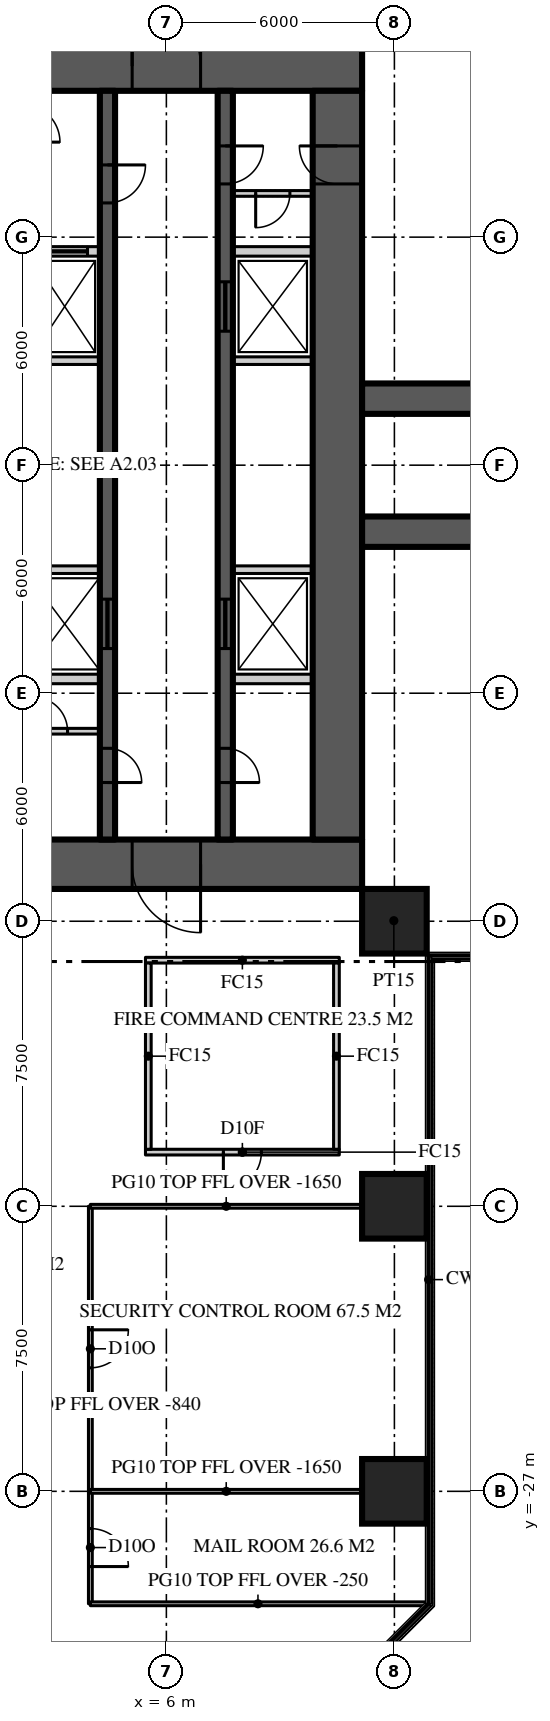
"""IFC4 building model, lengths in metres.
Left out: names, types, materials, properties, quantities, classifications, styles, units other than length and angle.
Written with IfcOpenShell. Run it as: python <this file> out.ifc"""

import sys

from ifc_helpers import new_model, si_unit, direction, frame, frame_2d, origin, origin_2d, place, context, subcontext, project, spatial, rectangle, extrude, element, fill, save


model = new_model("IFC4")
c1 = context("Model", 3, precision=1e-05, world=origin(), true_north=direction((0.0, 1.0)))
c2 = subcontext(c1, "Body", "Model", "MODEL_VIEW")
j1 = project(units=[si_unit("LENGTHUNIT", "METRE"), si_unit("PLANEANGLEUNIT", "RADIAN")], contexts=[c1])
p1 = place(None, origin())
s1 = spatial("IfcSite", under=j1, at=p1, CompositionType="ELEMENT")
p2 = place(p1, origin())
s2 = spatial("IfcBuilding", under=s1, at=p2, CompositionType="ELEMENT")
p3 = place(p2, origin())
s3 = spatial("IfcBuildingStorey", under=s2, at=p3, CompositionType="ELEMENT", Elevation=0.0)
p4 = place(p3, frame((-11.15, 10.5, 0.0), z_axis=(0.0, 0.0, 1.0), x_axis=(1.0, 0.0, 0.0)))
e1 = element("IfcWall", 1, at=p4, inside=s3, PredefinedType="SHEAR", context=c2, shape_type="SweptSolid", body=[
    extrude(rectangle(XDim=22.3, YDim=1.3, at=frame_2d((11.15, 0.0))), origin(), (0.0, 0.0, 1.0), 7.0),
])
p5 = place(p4, frame((4.25, 0.0, 0.0)))
e2 = element("IfcOpeningElement", 2, at=p5, cuts=e1, PredefinedType="OPENING", context=c2, shape_type="SweptSolid", body=[
    extrude(rectangle(XDim=1.8, YDim=2.2, at=frame_2d((0.9, 1.1))), frame((0.0, 0.66, 0.0), z_axis=(0.0, -1.0, 0.0), x_axis=(1.0, 0.0, 0.0)), (0.0, 0.0, 1.0), 1.32),
])
p6 = place(p4, frame((16.25, 0.0, 0.0)))
e3 = element("IfcOpeningElement", 3, at=p6, cuts=e1, PredefinedType="OPENING", context=c2, shape_type="SweptSolid", body=[
    extrude(rectangle(XDim=1.8, YDim=2.2, at=frame_2d((0.9, 1.1))), frame((0.0, 0.66, 0.0), z_axis=(0.0, -1.0, 0.0), x_axis=(1.0, 0.0, 0.0)), (0.0, 0.0, 1.0), 1.32),
])
p7 = place(p3, frame((11.15, -10.5, 0.0), z_axis=(0.0, 0.0, 1.0), x_axis=(-1.0, 0.0, 0.0)))
e4 = element("IfcWall", 4, at=p7, inside=s3, PredefinedType="SHEAR", context=c2, shape_type="SweptSolid", body=[
    extrude(rectangle(XDim=22.3, YDim=1.3, at=frame_2d((11.15, 0.0))), origin(), (0.0, 0.0, 1.0), 7.0),
])
p8 = place(p7, frame((16.25, 0.0, 0.0)))
e5 = element("IfcOpeningElement", 5, at=p8, cuts=e4, PredefinedType="OPENING", context=c2, shape_type="SweptSolid", body=[
    extrude(rectangle(XDim=1.8, YDim=2.2, at=frame_2d((0.9, 1.1))), frame((0.0, 0.66, 0.0), z_axis=(0.0, -1.0, 0.0), x_axis=(1.0, 0.0, 0.0)), (0.0, 0.0, 1.0), 1.32),
])
p9 = place(p7, frame((4.25, 0.0, 0.0)))
e6 = element("IfcOpeningElement", 6, at=p9, cuts=e4, PredefinedType="OPENING", context=c2, shape_type="SweptSolid", body=[
    extrude(rectangle(XDim=1.8, YDim=2.2, at=frame_2d((0.9, 1.1))), frame((0.0, 0.66, 0.0), z_axis=(0.0, -1.0, 0.0), x_axis=(1.0, 0.0, 0.0)), (0.0, 0.0, 1.0), 1.32),
])
p10 = place(p3, frame((10.5, -9.85, 0.0), z_axis=(0.0, 0.0, 1.0), x_axis=(0.0, 1.0, 0.0)))
e7 = element("IfcWall", 7, at=p10, inside=s3, PredefinedType="SHEAR", context=c2, shape_type="SweptSolid", body=[
    extrude(rectangle(XDim=19.7, YDim=1.3, at=frame_2d((9.85, 0.0))), origin(), (0.0, 0.0, 1.0), 7.0),
])
p11 = place(p10, frame((17.25, 0.0, 0.0)))
e8 = element("IfcOpeningElement", 8, at=p11, cuts=e7, PredefinedType="OPENING", context=c2, shape_type="SweptSolid", body=[
    extrude(rectangle(XDim=1.0, YDim=2.2, at=frame_2d((0.5, 1.1))), frame((0.0, 0.66, 0.0), z_axis=(0.0, -1.0, 0.0), x_axis=(1.0, 0.0, 0.0)), (0.0, 0.0, 1.0), 1.32),
])
for number, where, z_axis, x_axis in (
    (9, (11.15, -1.75, 0.0), (0.0, 0.0, 1.0), (1.0, 0.0, 0.0)),
    (10, (11.15, 1.75, 0.0), (0.0, 0.0, 1.0), (1.0, 0.0, 0.0)),
):
    element("IfcWall", number, at=place(p3, frame(where, z_axis=z_axis, x_axis=x_axis)), inside=s3, PredefinedType="SHEAR", context=c2, shape_type="SweptSolid", body=[
        extrude(rectangle(XDim=7.625, YDim=0.8, at=frame_2d((3.812, 0.0))), origin(), (0.0, 0.0, 1.0), 7.0),
    ])
for number, where, z_axis, x_axis in (
    (11, (12.0, -27.0, 0.0), (0.0, 0.0, 1.0), (1.0, 0.0, 0.0)),
    (12, (12.0, -19.5, 0.0), (0.0, 0.0, 1.0), (1.0, 0.0, 0.0)),
    (13, (12.0, -12.0, 0.0), (0.0, 0.0, 1.0), (1.0, 0.0, 0.0)),
):
    element("IfcColumn", number, at=place(p3, frame(where, z_axis=z_axis, x_axis=x_axis)), inside=s3, PredefinedType="COLUMN", context=c2, shape_type="SweptSolid", body=[
        extrude(rectangle(XDim=1.7, YDim=1.7, at=origin_2d()), origin(), (0.0, 0.0, 1.0), 7.0),
    ])
p12 = place(p3, frame((7.55, 9.85, 0.0), z_axis=(0.0, 0.0, 1.0), x_axis=(0.0, -1.0, 0.0)))
e14 = element("IfcWall", 14, at=p12, inside=s3, PredefinedType="SHEAR", context=c2, shape_type="SweptSolid", body=[
    extrude(rectangle(XDim=19.7, YDim=0.4, at=frame_2d((9.85, 0.0))), origin(), (0.0, 0.0, 1.0), 7.0),
])
p13 = place(p12, frame((1.45, 0.0, 0.0)))
e15 = element("IfcOpeningElement", 15, at=p13, cuts=e14, PredefinedType="OPENING", context=c2, shape_type="SweptSolid", body=[
    extrude(rectangle(XDim=1.0, YDim=2.2, at=frame_2d((0.5, 1.1))), frame((0.0, 0.21, 0.0), z_axis=(0.0, -1.0, 0.0), x_axis=(1.0, 0.0, 0.0)), (0.0, 0.0, 1.0), 0.42),
])
p14 = place(p12, frame((17.3, 0.0, 0.0)))
e16 = element("IfcOpeningElement", 16, at=p14, cuts=e14, PredefinedType="OPENING", context=c2, shape_type="SweptSolid", body=[
    extrude(rectangle(XDim=0.9, YDim=2.1, at=frame_2d((0.45, 1.05))), frame((0.0, 0.21, 0.0), z_axis=(0.0, -1.0, 0.0), x_axis=(1.0, 0.0, 0.0)), (0.0, 0.0, 1.0), 0.42),
])
p15 = place(p12, frame((5.025, 0.0, 0.0)))
e17 = element("IfcOpeningElement", 17, at=p15, cuts=e14, PredefinedType="OPENING", context=c2, shape_type="SweptSolid", body=[
    extrude(rectangle(XDim=1.3, YDim=2.2, at=frame_2d((0.65, 1.1))), frame((0.0, 0.21, 0.0), z_axis=(0.0, -1.0, 0.0), x_axis=(1.0, 0.0, 0.0)), (0.0, 0.0, 1.0), 0.42),
])
p16 = place(p12, frame((13.375, 0.0, 0.0)))
e18 = element("IfcOpeningElement", 18, at=p16, cuts=e14, PredefinedType="OPENING", context=c2, shape_type="SweptSolid", body=[
    extrude(rectangle(XDim=1.3, YDim=2.2, at=frame_2d((0.65, 1.1))), frame((0.0, 0.21, 0.0), z_axis=(0.0, -1.0, 0.0), x_axis=(1.0, 0.0, 0.0)), (0.0, 0.0, 1.0), 0.42),
])
p17 = place(p3, frame((4.45, 9.85, 0.0), z_axis=(0.0, 0.0, 1.0), x_axis=(0.0, -1.0, 0.0)))
e19 = element("IfcWall", 19, at=p17, inside=s3, PredefinedType="SHEAR", context=c2, shape_type="SweptSolid", body=[
    extrude(rectangle(XDim=19.7, YDim=0.4, at=frame_2d((9.85, 0.0))), origin(), (0.0, 0.0, 1.0), 7.0),
])
p18 = place(p17, frame((1.95, 0.0, 0.0)))
e20 = element("IfcOpeningElement", 20, at=p18, cuts=e19, PredefinedType="OPENING", context=c2, shape_type="SweptSolid", body=[
    extrude(rectangle(XDim=1.0, YDim=2.2, at=frame_2d((0.5, 1.1))), frame((0.0, 0.21, 0.0), z_axis=(0.0, -1.0, 0.0), x_axis=(1.0, 0.0, 0.0)), (0.0, 0.0, 1.0), 0.42),
])
p19 = place(p17, frame((17.3, 0.0, 0.0)))
e21 = element("IfcOpeningElement", 21, at=p19, cuts=e19, PredefinedType="OPENING", context=c2, shape_type="SweptSolid", body=[
    extrude(rectangle(XDim=0.9, YDim=2.1, at=frame_2d((0.45, 1.05))), frame((0.0, 0.21, 0.0), z_axis=(0.0, -1.0, 0.0), x_axis=(1.0, 0.0, 0.0)), (0.0, 0.0, 1.0), 0.42),
])
p20 = place(p17, frame((13.375, 0.0, 0.0)))
e22 = element("IfcOpeningElement", 22, at=p20, cuts=e19, PredefinedType="OPENING", context=c2, shape_type="SweptSolid", body=[
    extrude(rectangle(XDim=1.3, YDim=2.2, at=frame_2d((0.65, 1.1))), frame((0.0, 0.21, 0.0), z_axis=(0.0, -1.0, 0.0), x_axis=(1.0, 0.0, 0.0)), (0.0, 0.0, 1.0), 0.42),
])
p21 = place(p3, frame((2.4, 5.625, 0.0), z_axis=(0.0, 0.0, 1.0), x_axis=(1.0, 0.0, 0.0)))
e23 = element("IfcWall", 23, at=p21, inside=s3, PredefinedType="SOLIDWALL", context=c2, shape_type="SweptSolid", body=[
    extrude(rectangle(XDim=1.85, YDim=0.25, at=frame_2d((0.925, 0.0))), origin(), (0.0, 0.0, 1.0), 6.8),
])
p22 = place(p21, frame((0.325, 0.0, 0.0)))
e24 = element("IfcOpeningElement", 24, at=p22, cuts=e23, PredefinedType="OPENING", context=c2, shape_type="SweptSolid", body=[
    extrude(rectangle(XDim=1.2, YDim=2.2, at=frame_2d((0.6, 1.1))), frame((0.0, 0.135, 0.0), z_axis=(0.0, -1.0, 0.0), x_axis=(1.0, 0.0, 0.0)), (0.0, 0.0, 1.0), 0.27),
])
p23 = place(p3, frame((7.75, 5.625, 0.0), z_axis=(0.0, 0.0, 1.0), x_axis=(1.0, 0.0, 0.0)))
e25 = element("IfcWall", 25, at=p23, inside=s3, PredefinedType="SOLIDWALL", context=c2, shape_type="SweptSolid", body=[
    extrude(rectangle(XDim=2.1, YDim=0.25, at=frame_2d((1.05, 0.0))), origin(), (0.0, 0.0, 1.0), 6.8),
])
p24 = place(p3, frame((2.4, -5.625, 0.0), z_axis=(0.0, 0.0, 1.0), x_axis=(1.0, 0.0, 0.0)))
e26 = element("IfcWall", 26, at=p24, inside=s3, PredefinedType="SOLIDWALL", context=c2, shape_type="SweptSolid", body=[
    extrude(rectangle(XDim=1.85, YDim=0.25, at=frame_2d((0.925, 0.0))), origin(), (0.0, 0.0, 1.0), 6.8),
])
p25 = place(p3, frame((7.75, -5.625, 0.0), z_axis=(0.0, 0.0, 1.0), x_axis=(1.0, 0.0, 0.0)))
e27 = element("IfcWall", 27, at=p25, inside=s3, PredefinedType="SOLIDWALL", context=c2, shape_type="SweptSolid", body=[
    extrude(rectangle(XDim=2.1, YDim=0.25, at=frame_2d((1.05, 0.0))), origin(), (0.0, 0.0, 1.0), 6.8),
])
p26 = place(p3, frame((2.4, -2.75, 0.0), z_axis=(0.0, 0.0, 1.0), x_axis=(1.0, 0.0, 0.0)))
e28 = element("IfcWall", 28, at=p26, inside=s3, PredefinedType="SOLIDWALL", context=c2, shape_type="SweptSolid", body=[
    extrude(rectangle(XDim=1.85, YDim=0.2, at=frame_2d((0.925, 0.0))), origin(), (0.0, 0.0, 1.0), 6.8),
])
p27 = place(p3, frame((7.75, -2.75, 0.0), z_axis=(0.0, 0.0, 1.0), x_axis=(1.0, 0.0, 0.0)))
e29 = element("IfcWall", 29, at=p27, inside=s3, PredefinedType="SOLIDWALL", context=c2, shape_type="SweptSolid", body=[
    extrude(rectangle(XDim=2.1, YDim=0.2, at=frame_2d((1.05, 0.0))), origin(), (0.0, 0.0, 1.0), 6.8),
])
p28 = place(p3, frame((2.4, 2.75, 0.0), z_axis=(0.0, 0.0, 1.0), x_axis=(1.0, 0.0, 0.0)))
e30 = element("IfcWall", 30, at=p28, inside=s3, PredefinedType="SOLIDWALL", context=c2, shape_type="SweptSolid", body=[
    extrude(rectangle(XDim=1.85, YDim=0.2, at=frame_2d((0.925, 0.0))), origin(), (0.0, 0.0, 1.0), 6.8),
])
p29 = place(p3, frame((7.75, 2.75, 0.0), z_axis=(0.0, 0.0, 1.0), x_axis=(1.0, 0.0, 0.0)))
e31 = element("IfcWall", 31, at=p29, inside=s3, PredefinedType="SOLIDWALL", context=c2, shape_type="SweptSolid", body=[
    extrude(rectangle(XDim=2.1, YDim=0.2, at=frame_2d((1.05, 0.0))), origin(), (0.0, 0.0, 1.0), 6.8),
])
p30 = place(p3, frame((4.0, -19.5, 0.0), z_axis=(0.0, 0.0, 1.0), x_axis=(0.0, -1.0, 0.0)))
e32 = element("IfcWall", 32, at=p30, inside=s3, PredefinedType="PARTITIONING", context=c2, shape_type="SweptSolid", body=[
    extrude(rectangle(XDim=10.459, YDim=0.1, at=frame_2d((5.229, 0.0))), origin(), (0.0, 0.0, 1.0), 6.16),
])
p31 = place(p30, frame((3.25, 0.0, 0.0)))
e33 = element("IfcOpeningElement", 33, at=p31, cuts=e32, PredefinedType="OPENING", context=c2, shape_type="SweptSolid", body=[
    extrude(rectangle(XDim=1.0, YDim=2.2, at=frame_2d((0.5, 1.1))), frame((0.0, 0.06, 0.0), z_axis=(0.0, -1.0, 0.0), x_axis=(1.0, 0.0, 0.0)), (0.0, 0.0, 1.0), 0.12),
])
p32 = place(p30, frame((8.479, 0.0, 0.0)))
e34 = element("IfcOpeningElement", 34, at=p32, cuts=e32, PredefinedType="OPENING", context=c2, shape_type="SweptSolid", body=[
    extrude(rectangle(XDim=1.0, YDim=2.2, at=frame_2d((0.5, 1.1))), frame((0.0, 0.06, 0.0), z_axis=(0.0, -1.0, 0.0), x_axis=(1.0, 0.0, 0.0)), (0.0, 0.0, 1.0), 0.12),
])
for number, where, z_axis, x_axis in (
    (35, (4.0, -19.5, 0.0), (0.0, 0.0, 1.0), (1.0, 0.0, 0.0)),
    (36, (4.0, -27.0, 0.0), (0.0, 0.0, 1.0), (1.0, 0.0, 0.0)),
):
    element("IfcWall", number, at=place(p3, frame(where, z_axis=z_axis, x_axis=x_axis)), inside=s3, PredefinedType="PARTITIONING", context=c2, shape_type="SweptSolid", body=[
        extrude(rectangle(XDim=7.15, YDim=0.1, at=frame_2d((3.575, 0.0))), origin(), (0.0, 0.0, 1.0), 5.35),
    ])
p33 = place(p3, frame((4.0, -29.959, 0.0), z_axis=(0.0, 0.0, 1.0), x_axis=(1.0, 0.0, 0.0)))
e37 = element("IfcWall", 37, at=p33, inside=s3, PredefinedType="PARTITIONING", context=c2, shape_type="SweptSolid", body=[
    extrude(rectangle(XDim=8.82, YDim=0.1, at=frame_2d((4.41, 0.0))), origin(), (0.0, 0.0, 1.0), 6.75),
])
p34 = place(p3, frame((11.15, -11.15, 0.0), z_axis=(0.0, 0.0, 1.0), x_axis=(0.707106781187, -0.707106781187, 0.0)))
e38 = element("IfcWall", 38, at=p34, inside=s3, PredefinedType="PARTITIONING", context=c2, shape_type="SweptSolid", body=[
    extrude(rectangle(XDim=2.362, YDim=0.15, at=frame_2d((1.181, 0.0))), origin(), (0.0, 0.0, 1.0), 6.75),
])
p35 = place(p3, frame((2.4, -7.0, 0.0), z_axis=(0.0, 0.0, 1.0), x_axis=(1.0, 0.0, 0.0)))
e39 = element("IfcWall", 39, at=p35, inside=s3, PredefinedType="SOLIDWALL", context=c2, shape_type="SweptSolid", body=[
    extrude(rectangle(XDim=1.85, YDim=0.15, at=frame_2d((0.925, 0.0))), origin(), (0.0, 0.0, 1.0), 6.75),
])
p36 = place(p35, frame((0.1, 0.0, 0.0)))
e40 = element("IfcOpeningElement", 40, at=p36, cuts=e39, PredefinedType="OPENING", context=c2, shape_type="SweptSolid", body=[
    extrude(rectangle(XDim=0.9, YDim=2.1, at=frame_2d((0.45, 1.05))), frame((0.0, 0.085, 0.0), z_axis=(0.0, -1.0, 0.0), x_axis=(1.0, 0.0, 0.0)), (0.0, 0.0, 1.0), 0.17),
])
p37 = place(p3, frame((9.85, 7.15, 0.0), z_axis=(0.0, 0.0, 1.0), x_axis=(-1.0, 0.0, 0.0)))
e41 = element("IfcWall", 41, at=p37, inside=s3, PredefinedType="SOLIDWALL", context=c2, shape_type="SweptSolid", body=[
    extrude(rectangle(XDim=2.1, YDim=0.15, at=frame_2d((1.05, 0.0))), origin(), (0.0, 0.0, 1.0), 6.75),
])
p38 = place(p37, frame((0.6, 0.0, 0.0)))
e42 = element("IfcOpeningElement", 42, at=p38, cuts=e41, PredefinedType="OPENING", context=c2, shape_type="SweptSolid", body=[
    extrude(rectangle(XDim=0.9, YDim=2.1, at=frame_2d((0.45, 1.05))), frame((0.0, 0.085, 0.0), z_axis=(0.0, -1.0, 0.0), x_axis=(1.0, 0.0, 0.0)), (0.0, 0.0, 1.0), 0.17),
])
p39 = place(p3, frame((5.45, -13.025, 0.0), z_axis=(0.0, 0.0, 1.0), x_axis=(1.0, 0.0, 0.0)))
e43 = element("IfcWall", 43, at=p39, inside=s3, PredefinedType="SOLIDWALL", context=c2, shape_type="SweptSolid", body=[
    extrude(rectangle(XDim=5.1, YDim=0.15, at=frame_2d((2.55, 0.0))), origin(), (0.0, 0.0, 1.0), 6.75),
])
p40 = place(p3, frame((10.55, -18.075, 0.0), z_axis=(0.0, 0.0, 1.0), x_axis=(-1.0, 0.0, 0.0)))
e44 = element("IfcWall", 44, at=p40, inside=s3, PredefinedType="SOLIDWALL", context=c2, shape_type="SweptSolid", body=[
    extrude(rectangle(XDim=5.1, YDim=0.15, at=frame_2d((2.55, 0.0))), origin(), (0.0, 0.0, 1.0), 6.75),
])
p41 = place(p40, frame((2.05, 0.0, 0.0)))
e45 = element("IfcOpeningElement", 45, at=p41, cuts=e44, PredefinedType="OPENING", context=c2, shape_type="SweptSolid", body=[
    extrude(rectangle(XDim=1.0, YDim=2.2, at=frame_2d((0.5, 1.1))), frame((0.0, 0.085, 0.0), z_axis=(0.0, -1.0, 0.0), x_axis=(1.0, 0.0, 0.0)), (0.0, 0.0, 1.0), 0.17),
])
for number, where, z_axis, x_axis in (
    (46, (5.525, -13.1, 0.0), (0.0, 0.0, 1.0), (0.0, -1.0, 0.0)),
    (47, (10.475, -18.0, 0.0), (0.0, 0.0, 1.0), (0.0, 1.0, 0.0)),
):
    element("IfcWall", number, at=place(p3, frame(where, z_axis=z_axis, x_axis=x_axis)), inside=s3, PredefinedType="SOLIDWALL", context=c2, shape_type="SweptSolid", body=[
        extrude(rectangle(XDim=4.9, YDim=0.15, at=frame_2d((2.45, 0.0))), origin(), (0.0, 0.0, 1.0), 6.75),
    ])
p42 = place(p6, origin())
e48 = element("IfcDoor", 48, at=p42, inside=s3, OperationType="DOUBLE_DOOR_DOUBLE_SWING", PredefinedType="DOOR", context=c2, shape_type="SweptSolid", body=[
    extrude(rectangle(XDim=1.8, YDim=2.2, at=frame_2d((0.9, 1.1))), frame((0.0, 0.025, 0.0), z_axis=(0.0, -1.0, 0.0), x_axis=(1.0, 0.0, 0.0)), (0.0, 0.0, 1.0), 0.05),
])
fill(e3, e48)
p43 = place(p9, origin())
e49 = element("IfcDoor", 49, at=p43, inside=s3, OperationType="DOUBLE_DOOR_DOUBLE_SWING", PredefinedType="DOOR", context=c2, shape_type="SweptSolid", body=[
    extrude(rectangle(XDim=1.8, YDim=2.2, at=frame_2d((0.9, 1.1))), frame((0.0, 0.025, 0.0), z_axis=(0.0, -1.0, 0.0), x_axis=(1.0, 0.0, 0.0)), (0.0, 0.0, 1.0), 0.05),
])
fill(e6, e49)
p44 = place(p13, origin())
e50 = element("IfcDoor", 50, at=p44, inside=s3, OperationType="SINGLE_SWING_LEFT", PredefinedType="DOOR", context=c2, shape_type="SweptSolid", body=[
    extrude(rectangle(XDim=1.0, YDim=2.2, at=frame_2d((0.5, 1.1))), frame((0.0, 0.025, 0.0), z_axis=(0.0, -1.0, 0.0), x_axis=(1.0, 0.0, 0.0)), (0.0, 0.0, 1.0), 0.05),
])
fill(e15, e50)
p45 = place(p11, origin())
e51 = element("IfcDoor", 51, at=p45, inside=s3, OperationType="SINGLE_SWING_RIGHT", PredefinedType="DOOR", context=c2, shape_type="SweptSolid", body=[
    extrude(rectangle(XDim=1.0, YDim=2.2, at=frame_2d((0.5, 1.1))), frame((0.0, 0.025, 0.0), z_axis=(0.0, -1.0, 0.0), x_axis=(1.0, 0.0, 0.0)), (0.0, 0.0, 1.0), 0.05),
])
fill(e8, e51)
p46 = place(p18, origin())
e52 = element("IfcDoor", 52, at=p46, inside=s3, OperationType="SINGLE_SWING_LEFT", PredefinedType="DOOR", context=c2, shape_type="SweptSolid", body=[
    extrude(rectangle(XDim=1.0, YDim=2.2, at=frame_2d((0.5, 1.1))), frame((0.0, 0.025, 0.0), z_axis=(0.0, -1.0, 0.0), x_axis=(1.0, 0.0, 0.0)), (0.0, 0.0, 1.0), 0.05),
])
fill(e20, e52)
p47 = place(p14, origin())
e53 = element("IfcDoor", 53, at=p47, inside=s3, OperationType="SINGLE_SWING_RIGHT", PredefinedType="DOOR", context=c2, shape_type="SweptSolid", body=[
    extrude(rectangle(XDim=0.9, YDim=2.1, at=frame_2d((0.45, 1.05))), frame((0.0, 0.025, 0.0), z_axis=(0.0, -1.0, 0.0), x_axis=(1.0, 0.0, 0.0)), (0.0, 0.0, 1.0), 0.05),
])
fill(e16, e53)
p48 = place(p19, origin())
e54 = element("IfcDoor", 54, at=p48, inside=s3, OperationType="SINGLE_SWING_RIGHT", PredefinedType="DOOR", context=c2, shape_type="SweptSolid", body=[
    extrude(rectangle(XDim=0.9, YDim=2.1, at=frame_2d((0.45, 1.05))), frame((0.0, 0.025, 0.0), z_axis=(0.0, -1.0, 0.0), x_axis=(1.0, 0.0, 0.0)), (0.0, 0.0, 1.0), 0.05),
])
fill(e21, e54)
p49 = place(p15, origin())
e55 = element("IfcDoor", 55, at=p49, inside=s3, OperationType="SLIDING_TO_LEFT", PredefinedType="DOOR", context=c2, shape_type="SweptSolid", body=[
    extrude(rectangle(XDim=1.3, YDim=2.2, at=frame_2d((0.65, 1.1))), frame((0.0, 0.025, 0.0), z_axis=(0.0, -1.0, 0.0), x_axis=(1.0, 0.0, 0.0)), (0.0, 0.0, 1.0), 0.05),
])
fill(e17, e55)
p50 = place(p16, origin())
e56 = element("IfcDoor", 56, at=p50, inside=s3, OperationType="SLIDING_TO_LEFT", PredefinedType="DOOR", context=c2, shape_type="SweptSolid", body=[
    extrude(rectangle(XDim=1.3, YDim=2.2, at=frame_2d((0.65, 1.1))), frame((0.0, 0.025, 0.0), z_axis=(0.0, -1.0, 0.0), x_axis=(1.0, 0.0, 0.0)), (0.0, 0.0, 1.0), 0.05),
])
fill(e18, e56)
p51 = place(p20, origin())
e57 = element("IfcDoor", 57, at=p51, inside=s3, OperationType="SLIDING_TO_LEFT", PredefinedType="DOOR", context=c2, shape_type="SweptSolid", body=[
    extrude(rectangle(XDim=1.3, YDim=2.2, at=frame_2d((0.65, 1.1))), frame((0.0, 0.025, 0.0), z_axis=(0.0, -1.0, 0.0), x_axis=(1.0, 0.0, 0.0)), (0.0, 0.0, 1.0), 0.05),
])
fill(e22, e57)
p52 = place(p22, origin())
e58 = element("IfcDoor", 58, at=p52, inside=s3, OperationType="SLIDING_TO_LEFT", PredefinedType="DOOR", context=c2, shape_type="SweptSolid", body=[
    extrude(rectangle(XDim=1.2, YDim=2.2, at=frame_2d((0.6, 1.1))), frame((0.0, 0.025, 0.0), z_axis=(0.0, -1.0, 0.0), x_axis=(1.0, 0.0, 0.0)), (0.0, 0.0, 1.0), 0.05),
])
fill(e24, e58)
p53 = place(p31, origin())
e59 = element("IfcDoor", 59, at=p53, inside=s3, OperationType="SINGLE_SWING_LEFT", PredefinedType="DOOR", context=c2, shape_type="SweptSolid", body=[
    extrude(rectangle(XDim=1.0, YDim=2.2, at=frame_2d((0.5, 1.1))), frame((0.0, 0.025, 0.0), z_axis=(0.0, -1.0, 0.0), x_axis=(1.0, 0.0, 0.0)), (0.0, 0.0, 1.0), 0.05),
])
fill(e33, e59)
p54 = place(p32, origin())
e60 = element("IfcDoor", 60, at=p54, inside=s3, OperationType="SINGLE_SWING_RIGHT", PredefinedType="DOOR", context=c2, shape_type="SweptSolid", body=[
    extrude(rectangle(XDim=1.0, YDim=2.2, at=frame_2d((0.5, 1.1))), frame((0.0, 0.025, 0.0), z_axis=(0.0, -1.0, 0.0), x_axis=(1.0, 0.0, 0.0)), (0.0, 0.0, 1.0), 0.05),
])
fill(e34, e60)
p55 = place(p36, origin())
e61 = element("IfcDoor", 61, at=p55, inside=s3, OperationType="SINGLE_SWING_LEFT", PredefinedType="DOOR", context=c2, shape_type="SweptSolid", body=[
    extrude(rectangle(XDim=0.9, YDim=2.1, at=frame_2d((0.45, 1.05))), frame((0.0, 0.025, 0.0), z_axis=(0.0, -1.0, 0.0), x_axis=(1.0, 0.0, 0.0)), (0.0, 0.0, 1.0), 0.05),
])
fill(e40, e61)
p56 = place(p38, origin())
e62 = element("IfcDoor", 62, at=p56, inside=s3, OperationType="SINGLE_SWING_RIGHT", PredefinedType="DOOR", context=c2, shape_type="SweptSolid", body=[
    extrude(rectangle(XDim=0.9, YDim=2.1, at=frame_2d((0.45, 1.05))), frame((0.0, 0.025, 0.0), z_axis=(0.0, -1.0, 0.0), x_axis=(1.0, 0.0, 0.0)), (0.0, 0.0, 1.0), 0.05),
])
fill(e42, e62)
p57 = place(p41, origin())
e63 = element("IfcDoor", 63, at=p57, inside=s3, OperationType="SINGLE_SWING_RIGHT", PredefinedType="DOOR", context=c2, shape_type="SweptSolid", body=[
    extrude(rectangle(XDim=1.0, YDim=2.2, at=frame_2d((0.5, 1.1))), frame((0.0, 0.025, 0.0), z_axis=(0.0, -1.0, 0.0), x_axis=(1.0, 0.0, 0.0)), (0.0, 0.0, 1.0), 0.05),
])
fill(e45, e63)
save(model, sys.argv[1])
